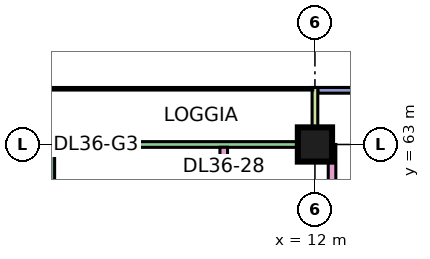
"""IFC4 building model, lengths in metres.
Left out: names, types, materials, properties, quantities, classifications, styles, units other than length and angle.
Written with IfcOpenShell. Run it as: python <this file> out.ifc"""

import sys

from ifc_helpers import new_model, si_unit, direction, frame, frame_2d, origin, origin_2d, place, context, subcontext, project, spatial, rectangle, extrude, element, save


model = new_model("IFC4")
c1 = context("Model", 3, precision=1e-05, world=origin(), true_north=direction((0.0, 1.0)))
c2 = subcontext(c1, "Body", "Model", "MODEL_VIEW")
j1 = project(units=[si_unit("LENGTHUNIT", "METRE"), si_unit("PLANEANGLEUNIT", "RADIAN")], contexts=[c1])
p1 = place(None, origin())
s1 = spatial("IfcSite", under=j1, at=p1, CompositionType="ELEMENT")
p2 = place(p1, origin())
s2 = spatial("IfcBuilding", under=s1, at=p2, CompositionType="ELEMENT")
p3 = place(p2, frame((0.0, 0.0, 161.15)))
s3 = spatial("IfcBuildingStorey", under=s2, at=p3, CompositionType="ELEMENT", Elevation=161.15)
p4 = place(p3, frame((12.0, 63.0, 0.0), z_axis=(0.0, 0.0, 1.0), x_axis=(1.0, 0.0, 0.0)))
e1 = element("IfcColumn", 1, at=p4, inside=s3, PredefinedType="COLUMN", context=c2, shape_type="SweptSolid", body=[
    extrude(rectangle(XDim=0.9, YDim=0.9, at=origin_2d()), origin(), (0.0, 0.0, 1.0), 3.75),
])
p5 = place(p3, frame((22.5, 64.425, 0.0), z_axis=(0.0, 0.0, 1.0), x_axis=(-1.0, 0.0, 0.0)))
e2 = element("IfcWall", 2, at=p5, inside=s3, PredefinedType="SOLIDWALL", context=c2, shape_type="SweptSolid", body=[
    extrude(rectangle(XDim=10.425, YDim=0.15, at=frame_2d((5.212, 0.0))), origin(), (0.0, 0.0, 1.0), 3.35),
])
p6 = place(p5, frame((0.825, 0.0, 0.45)))
e3 = element("IfcOpeningElement", 3, at=p6, cuts=e2, PredefinedType="OPENING", context=c2, shape_type="SweptSolid", body=[
    extrude(rectangle(XDim=3.0, YDim=2.4, at=frame_2d((1.5, 1.2))), frame((0.0, 0.085, 0.0), z_axis=(0.0, -1.0, 0.0), x_axis=(1.0, 0.0, 0.0)), (0.0, 0.0, 1.0), 0.17),
])
p7 = place(p5, frame((5.85, 0.0, 0.45)))
e4 = element("IfcOpeningElement", 4, at=p7, cuts=e2, PredefinedType="OPENING", context=c2, shape_type="SweptSolid", body=[
    extrude(rectangle(XDim=3.0, YDim=2.4, at=frame_2d((1.5, 1.2))), frame((0.0, 0.085, 0.0), z_axis=(0.0, -1.0, 0.0), x_axis=(1.0, 0.0, 0.0)), (0.0, 0.0, 1.0), 0.17),
])
p8 = place(p3, frame((11.925, 63.0, 0.0), z_axis=(0.0, 0.0, 1.0), x_axis=(-1.0, 0.0, 0.0)))
e5 = element("IfcWall", 5, at=p8, inside=s3, PredefinedType="SOLIDWALL", context=c2, shape_type="SweptSolid", body=[
    extrude(rectangle(XDim=10.35, YDim=0.15, at=frame_2d((5.175, 0.0))), origin(), (0.0, 0.0, 1.0), 3.35),
])
p9 = place(p8, frame((7.688, 0.0, 0.0)))
e6 = element("IfcOpeningElement", 6, at=p9, cuts=e5, PredefinedType="OPENING", context=c2, shape_type="SweptSolid", body=[
    extrude(rectangle(XDim=1.8, YDim=2.4, at=frame_2d((0.9, 1.2))), frame((0.0, 0.085, 0.0), z_axis=(0.0, -1.0, 0.0), x_axis=(1.0, 0.0, 0.0)), (0.0, 0.0, 1.0), 0.17),
])
p10 = place(p3, frame((12.0, 64.5, 0.0), z_axis=(0.0, 0.0, 1.0), x_axis=(0.0, -1.0, 0.0)))
e7 = element("IfcWall", 7, at=p10, inside=s3, PredefinedType="SOLIDWALL", context=c2, shape_type="SweptSolid", body=[
    extrude(rectangle(XDim=1.5, YDim=0.15, at=frame_2d((0.75, 0.0))), origin(), (0.0, 0.0, 1.0), 3.35),
])
p11 = place(p3, frame((5.1, 36.1, 0.0), z_axis=(0.0, 0.0, 1.0), x_axis=(0.0, 1.0, 0.0)))
e8 = element("IfcWall", 8, at=p11, inside=s3, PredefinedType="PARTITIONING", context=c2, shape_type="SweptSolid", body=[
    extrude(rectangle(XDim=26.826, YDim=0.1, at=frame_2d((13.413, 0.0))), origin(), (0.0, 0.0, 1.0), 3.35),
])
p12 = place(p11, frame((0.95, 0.0, 0.0)))
e9 = element("IfcOpeningElement", 9, at=p12, cuts=e8, PredefinedType="OPENING", context=c2, shape_type="SweptSolid", body=[
    extrude(rectangle(XDim=0.9, YDim=2.1, at=frame_2d((0.45, 1.05))), frame((0.0, 0.06, 0.0), z_axis=(0.0, -1.0, 0.0), x_axis=(1.0, 0.0, 0.0)), (0.0, 0.0, 1.0), 0.12),
])
p13 = place(p11, frame((3.95, 0.0, 0.0)))
e10 = element("IfcOpeningElement", 10, at=p13, cuts=e8, PredefinedType="OPENING", context=c2, shape_type="SweptSolid", body=[
    extrude(rectangle(XDim=0.9, YDim=2.1, at=frame_2d((0.45, 1.05))), frame((0.0, 0.06, 0.0), z_axis=(0.0, -1.0, 0.0), x_axis=(1.0, 0.0, 0.0)), (0.0, 0.0, 1.0), 0.12),
])
p14 = place(p11, frame((6.95, 0.0, 0.0)))
e11 = element("IfcOpeningElement", 11, at=p14, cuts=e8, PredefinedType="OPENING", context=c2, shape_type="SweptSolid", body=[
    extrude(rectangle(XDim=0.9, YDim=2.1, at=frame_2d((0.45, 1.05))), frame((0.0, 0.06, 0.0), z_axis=(0.0, -1.0, 0.0), x_axis=(1.0, 0.0, 0.0)), (0.0, 0.0, 1.0), 0.12),
])
p15 = place(p11, frame((9.95, 0.0, 0.0)))
e12 = element("IfcOpeningElement", 12, at=p15, cuts=e8, PredefinedType="OPENING", context=c2, shape_type="SweptSolid", body=[
    extrude(rectangle(XDim=0.9, YDim=2.1, at=frame_2d((0.45, 1.05))), frame((0.0, 0.06, 0.0), z_axis=(0.0, -1.0, 0.0), x_axis=(1.0, 0.0, 0.0)), (0.0, 0.0, 1.0), 0.12),
])
p16 = place(p11, frame((21.95, 0.0, 0.0)))
e13 = element("IfcOpeningElement", 13, at=p16, cuts=e8, PredefinedType="OPENING", context=c2, shape_type="SweptSolid", body=[
    extrude(rectangle(XDim=0.9, YDim=2.1, at=frame_2d((0.45, 1.05))), frame((0.0, 0.06, 0.0), z_axis=(0.0, -1.0, 0.0), x_axis=(1.0, 0.0, 0.0)), (0.0, 0.0, 1.0), 0.12),
])
p17 = place(p11, frame((15.95, 0.0, 0.0)))
e14 = element("IfcOpeningElement", 14, at=p17, cuts=e8, PredefinedType="OPENING", context=c2, shape_type="SweptSolid", body=[
    extrude(rectangle(XDim=0.9, YDim=2.1, at=frame_2d((0.45, 1.05))), frame((0.0, 0.06, 0.0), z_axis=(0.0, -1.0, 0.0), x_axis=(1.0, 0.0, 0.0)), (0.0, 0.0, 1.0), 0.12),
])
p18 = place(p11, frame((24.95, 0.0, 0.0)))
e15 = element("IfcOpeningElement", 15, at=p18, cuts=e8, PredefinedType="OPENING", context=c2, shape_type="SweptSolid", body=[
    extrude(rectangle(XDim=0.9, YDim=2.1, at=frame_2d((0.45, 1.05))), frame((0.0, 0.06, 0.0), z_axis=(0.0, -1.0, 0.0), x_axis=(1.0, 0.0, 0.0)), (0.0, 0.0, 1.0), 0.12),
])
p19 = place(p3, frame((9.6, 20.0, 0.0), z_axis=(0.0, 0.0, 1.0), x_axis=(0.0, 1.0, 0.0)))
e16 = element("IfcWall", 16, at=p19, inside=s3, PredefinedType="PARTITIONING", context=c2, shape_type="SweptSolid", body=[
    extrude(rectangle(XDim=42.926, YDim=0.2, at=frame_2d((21.463, 0.0))), origin(), (0.0, 0.0, 1.0), 3.35),
])
p20 = place(p19, frame((40.8, 0.0, 0.0)))
e17 = element("IfcOpeningElement", 17, at=p20, cuts=e16, PredefinedType="OPENING", context=c2, shape_type="SweptSolid", body=[
    extrude(rectangle(XDim=1.0, YDim=2.1, at=frame_2d((0.5, 1.05))), frame((0.0, 0.11, 0.0), z_axis=(0.0, -1.0, 0.0), x_axis=(1.0, 0.0, 0.0)), (0.0, 0.0, 1.0), 0.22),
])
p21 = place(p19, frame((0.6, 0.0, 0.0)))
e18 = element("IfcOpeningElement", 18, at=p21, cuts=e16, PredefinedType="OPENING", context=c2, shape_type="SweptSolid", body=[
    extrude(rectangle(XDim=1.2, YDim=2.1, at=frame_2d((0.6, 1.05))), frame((0.0, 0.11, 0.0), z_axis=(0.0, -1.0, 0.0), x_axis=(1.0, 0.0, 0.0)), (0.0, 0.0, 1.0), 0.22),
])
p22 = place(p19, frame((3.9, 0.0, 0.0)))
e19 = element("IfcOpeningElement", 19, at=p22, cuts=e16, PredefinedType="OPENING", context=c2, shape_type="SweptSolid", body=[
    extrude(rectangle(XDim=1.0, YDim=2.1, at=frame_2d((0.5, 1.05))), frame((0.0, 0.11, 0.0), z_axis=(0.0, -1.0, 0.0), x_axis=(1.0, 0.0, 0.0)), (0.0, 0.0, 1.0), 0.22),
])
p23 = place(p3, frame((12.45, 20.0, 0.0), z_axis=(0.0, 0.0, 1.0), x_axis=(0.0, 1.0, 0.0)))
e20 = element("IfcWall", 20, at=p23, inside=s3, PredefinedType="PARTITIONING", context=c2, shape_type="SweptSolid", body=[
    extrude(rectangle(XDim=43.0, YDim=0.2, at=frame_2d((21.5, 0.0))), origin(), (0.0, 0.0, 1.0), 3.35),
])
p24 = place(p23, frame((5.95, 0.0, 0.0)))
e21 = element("IfcOpeningElement", 21, at=p24, cuts=e20, PredefinedType="OPENING", context=c2, shape_type="SweptSolid", body=[
    extrude(rectangle(XDim=1.0, YDim=2.1, at=frame_2d((0.5, 1.05))), frame((0.0, 0.11, 0.0), z_axis=(0.0, -1.0, 0.0), x_axis=(1.0, 0.0, 0.0)), (0.0, 0.0, 1.0), 0.22),
])
p25 = place(p23, frame((12.0, 0.0, 0.0)))
e22 = element("IfcOpeningElement", 22, at=p25, cuts=e20, PredefinedType="OPENING", context=c2, shape_type="SweptSolid", body=[
    extrude(rectangle(XDim=1.0, YDim=2.1, at=frame_2d((0.5, 1.05))), frame((0.0, 0.11, 0.0), z_axis=(0.0, -1.0, 0.0), x_axis=(1.0, 0.0, 0.0)), (0.0, 0.0, 1.0), 0.22),
])
p26 = place(p23, frame((23.35, 0.0, 0.0)))
e23 = element("IfcOpeningElement", 23, at=p26, cuts=e20, PredefinedType="OPENING", context=c2, shape_type="SweptSolid", body=[
    extrude(rectangle(XDim=1.0, YDim=2.1, at=frame_2d((0.5, 1.05))), frame((0.0, 0.11, 0.0), z_axis=(0.0, -1.0, 0.0), x_axis=(1.0, 0.0, 0.0)), (0.0, 0.0, 1.0), 0.22),
])
p27 = place(p23, frame((35.2, 0.0, 0.0)))
e24 = element("IfcOpeningElement", 24, at=p27, cuts=e20, PredefinedType="OPENING", context=c2, shape_type="SweptSolid", body=[
    extrude(rectangle(XDim=1.0, YDim=2.1, at=frame_2d((0.5, 1.05))), frame((0.0, 0.11, 0.0), z_axis=(0.0, -1.0, 0.0), x_axis=(1.0, 0.0, 0.0)), (0.0, 0.0, 1.0), 0.22),
])
p28 = place(p23, frame((1.15, 0.0, 0.0)))
e25 = element("IfcOpeningElement", 25, at=p28, cuts=e20, PredefinedType="OPENING", context=c2, shape_type="SweptSolid", body=[
    extrude(rectangle(XDim=1.8, YDim=2.1, at=frame_2d((0.9, 1.05))), frame((0.0, 0.11, 0.0), z_axis=(0.0, -1.0, 0.0), x_axis=(1.0, 0.0, 0.0)), (0.0, 0.0, 1.0), 0.22),
])
p29 = place(p23, frame((28.6, 0.0, 0.0)))
e26 = element("IfcOpeningElement", 26, at=p29, cuts=e20, PredefinedType="OPENING", context=c2, shape_type="SweptSolid", body=[
    extrude(rectangle(XDim=1.8, YDim=2.1, at=frame_2d((0.9, 1.05))), frame((0.0, 0.11, 0.0), z_axis=(0.0, -1.0, 0.0), x_axis=(1.0, 0.0, 0.0)), (0.0, 0.0, 1.0), 0.22),
])
save(model, sys.argv[1])
